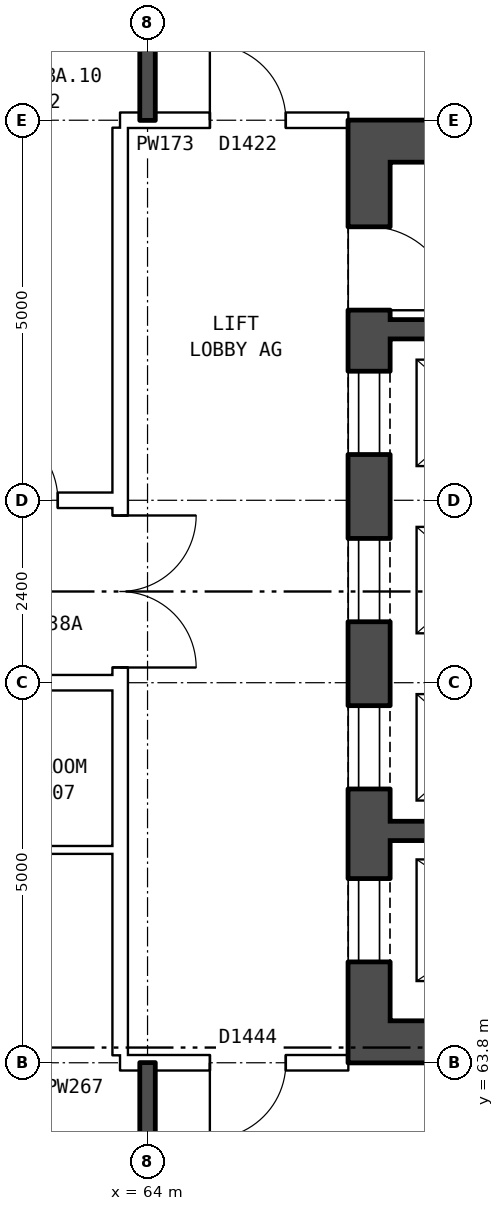
"""IFC4 building model, lengths in metres.
Left out: names, types, materials, properties, quantities, classifications, styles, units other than length and angle.
Written with IfcOpenShell. Run it as: python <this file> out.ifc"""

import sys

from ifc_helpers import new_model, si_unit, direction, frame, frame_2d, origin, place, context, subcontext, project, spatial, rectangle, extrude, element, fill, save


model = new_model("IFC4")
c1 = context("Model", 3, precision=1e-05, world=origin(), true_north=direction((0.0, 1.0)))
c2 = subcontext(c1, "Body", "Model", "MODEL_VIEW")
j1 = project(units=[si_unit("LENGTHUNIT", "METRE"), si_unit("PLANEANGLEUNIT", "RADIAN")], contexts=[c1])
p1 = place(None, origin())
s1 = spatial("IfcSite", under=j1, at=p1, CompositionType="ELEMENT")
p2 = place(p1, origin())
s2 = spatial("IfcBuilding", under=s1, at=p2, CompositionType="ELEMENT")
p3 = place(p2, frame((0.0, 0.0, 136.1)))
s3 = spatial("IfcBuildingStorey", under=s2, at=p3, CompositionType="ELEMENT", Elevation=136.1)
p4 = place(p3, frame((66.915, 63.8, 0.0), z_axis=(0.0, 0.0, 1.0), x_axis=(0.0, 1.0, 0.0)))
e1 = element("IfcWall", 1, at=p4, inside=s3, PredefinedType="SHEAR", context=c2, shape_type="SweptSolid", body=[
    extrude(rectangle(XDim=12.4, YDim=0.55, at=frame_2d((6.2, 0.0))), origin(), (0.0, 0.0, 1.0), 2.85),
])
p5 = place(p4, frame((1.325, 0.0, 0.0)))
e2 = element("IfcOpeningElement", 2, at=p5, cuts=e1, PredefinedType="OPENING", context=c2, shape_type="SweptSolid", body=[
    extrude(rectangle(XDim=1.1, YDim=2.1, at=frame_2d((0.55, 1.05))), frame((0.0, 0.285, 0.0), z_axis=(0.0, -1.0, 0.0), x_axis=(1.0, 0.0, 0.0)), (0.0, 0.0, 1.0), 0.57),
])
p6 = place(p4, frame((3.6, 0.0, 0.0)))
e3 = element("IfcOpeningElement", 3, at=p6, cuts=e1, PredefinedType="OPENING", context=c2, shape_type="SweptSolid", body=[
    extrude(rectangle(XDim=1.1, YDim=2.1, at=frame_2d((0.55, 1.05))), frame((0.0, 0.285, 0.0), z_axis=(0.0, -1.0, 0.0), x_axis=(1.0, 0.0, 0.0)), (0.0, 0.0, 1.0), 0.57),
])
p7 = place(p4, frame((5.8, 0.0, 0.0)))
e4 = element("IfcOpeningElement", 4, at=p7, cuts=e1, PredefinedType="OPENING", context=c2, shape_type="SweptSolid", body=[
    extrude(rectangle(XDim=1.1, YDim=2.1, at=frame_2d((0.55, 1.05))), frame((0.0, 0.285, 0.0), z_axis=(0.0, -1.0, 0.0), x_axis=(1.0, 0.0, 0.0)), (0.0, 0.0, 1.0), 0.57),
])
p8 = place(p4, frame((8.0, 0.0, 0.0)))
e5 = element("IfcOpeningElement", 5, at=p8, cuts=e1, PredefinedType="OPENING", context=c2, shape_type="SweptSolid", body=[
    extrude(rectangle(XDim=1.1, YDim=2.1, at=frame_2d((0.55, 1.05))), frame((0.0, 0.285, 0.0), z_axis=(0.0, -1.0, 0.0), x_axis=(1.0, 0.0, 0.0)), (0.0, 0.0, 1.0), 0.57),
])
p9 = place(p4, frame((9.9, 0.0, 0.0)))
e6 = element("IfcOpeningElement", 6, at=p9, cuts=e1, PredefinedType="OPENING", context=c2, shape_type="SweptSolid", body=[
    extrude(rectangle(XDim=1.1, YDim=2.1, at=frame_2d((0.55, 1.05))), frame((0.0, 0.285, 0.0), z_axis=(0.0, -1.0, 0.0), x_axis=(1.0, 0.0, 0.0)), (0.0, 0.0, 1.0), 0.57),
])
for number, where, z_axis, x_axis in (
    (7, (67.19, 64.075, 0.0), (0.0, 0.0, 1.0), (1.0, 0.0, 0.0)),
    (8, (67.19, 75.925, 0.0), (0.0, 0.0, 1.0), (1.0, 0.0, 0.0)),
):
    element("IfcWall", number, at=place(p3, frame(where, z_axis=z_axis, x_axis=x_axis)), inside=s3, PredefinedType="SHEAR", context=c2, shape_type="SweptSolid", body=[
        extrude(rectangle(XDim=7.9, YDim=0.55, at=frame_2d((3.95, 0.0))), origin(), (0.0, 0.0, 1.0), 2.85),
    ])
p10 = place(p3, frame((67.19, 66.85, 0.0), z_axis=(0.0, 0.0, 1.0), x_axis=(1.0, 0.0, 0.0)))
e9 = element("IfcWall", 9, at=p10, inside=s3, PredefinedType="SHEAR", context=c2, shape_type="SweptSolid", body=[
    extrude(rectangle(XDim=3.445, YDim=0.25, at=frame_2d((1.723, 0.0))), origin(), (0.0, 0.0, 1.0), 2.85),
])
p11 = place(p3, frame((67.19, 73.45, 0.0), z_axis=(0.0, 0.0, 1.0), x_axis=(1.0, 0.0, 0.0)))
e10 = element("IfcWall", 10, at=p11, inside=s3, PredefinedType="SHEAR", context=c2, shape_type="SweptSolid", body=[
    extrude(rectangle(XDim=2.375, YDim=0.25, at=frame_2d((1.188, 0.0))), origin(), (0.0, 0.0, 1.0), 2.85),
])
p12 = place(p3, frame((63.64, 63.9, 0.0), z_axis=(0.0, 0.0, 1.0), x_axis=(0.0, 1.0, 0.0)))
e11 = element("IfcWall", 11, at=p12, inside=s3, PredefinedType="PARTITIONING", context=c2, shape_type="SweptSolid", body=[
    extrude(rectangle(XDim=12.2, YDim=0.2, at=frame_2d((6.1, 0.0))), origin(), (0.0, 0.0, 1.0), 2.85),
])
p13 = place(p12, frame((5.1, 0.0, 0.0)))
e12 = element("IfcOpeningElement", 12, at=p13, cuts=e11, PredefinedType="OPENING", context=c2, shape_type="SweptSolid", body=[
    extrude(rectangle(XDim=2.0, YDim=2.1, at=frame_2d((1.0, 1.05))), frame((0.0, 0.11, 0.0), z_axis=(0.0, -1.0, 0.0), x_axis=(1.0, 0.0, 0.0)), (0.0, 0.0, 1.0), 0.22),
])
p14 = place(p3, frame((63.64, 63.8, 0.0), z_axis=(0.0, 0.0, 1.0), x_axis=(1.0, 0.0, 0.0)))
e13 = element("IfcWall", 13, at=p14, inside=s3, PredefinedType="PARTITIONING", context=c2, shape_type="SweptSolid", body=[
    extrude(rectangle(XDim=3.0, YDim=0.2, at=frame_2d((1.5, 0.0))), origin(), (0.0, 0.0, 1.0), 2.85),
])
p15 = place(p14, frame((1.18, 0.0, 0.0)))
e14 = element("IfcOpeningElement", 14, at=p15, cuts=e13, PredefinedType="OPENING", context=c2, shape_type="SweptSolid", body=[
    extrude(rectangle(XDim=1.0, YDim=2.1, at=frame_2d((0.5, 1.05))), frame((0.0, 0.11, 0.0), z_axis=(0.0, -1.0, 0.0), x_axis=(1.0, 0.0, 0.0)), (0.0, 0.0, 1.0), 0.22),
])
p16 = place(p3, frame((61.0, 66.6, 0.0), z_axis=(0.0, 0.0, 1.0), x_axis=(1.0, 0.0, 0.0)))
e15 = element("IfcWall", 15, at=p16, inside=s3, PredefinedType="PARTITIONING", context=c2, shape_type="SweptSolid", body=[
    extrude(rectangle(XDim=2.64, YDim=0.1, at=frame_2d((1.32, 0.0))), origin(), (0.0, 0.0, 1.0), 2.85),
])
p17 = place(p3, frame((44.36, 68.8, 0.0), z_axis=(0.0, 0.0, 1.0), x_axis=(1.0, 0.0, 0.0)))
e16 = element("IfcWall", 16, at=p17, inside=s3, PredefinedType="PARTITIONING", context=c2, shape_type="SweptSolid", body=[
    extrude(rectangle(XDim=19.28, YDim=0.2, at=frame_2d((9.64, 0.0))), origin(), (0.0, 0.0, 1.0), 2.85),
])
p18 = place(p17, frame((14.64, 0.0, 0.0)))
e17 = element("IfcOpeningElement", 17, at=p18, cuts=e16, PredefinedType="OPENING", context=c2, shape_type="SweptSolid", body=[
    extrude(rectangle(XDim=1.0, YDim=2.1, at=frame_2d((0.5, 1.05))), frame((0.0, 0.11, 0.0), z_axis=(0.0, -1.0, 0.0), x_axis=(1.0, 0.0, 0.0)), (0.0, 0.0, 1.0), 0.22),
])
p19 = place(p17, frame((8.64, 0.0, 0.0)))
e18 = element("IfcOpeningElement", 18, at=p19, cuts=e16, PredefinedType="OPENING", context=c2, shape_type="SweptSolid", body=[
    extrude(rectangle(XDim=1.0, YDim=2.1, at=frame_2d((0.5, 1.05))), frame((0.0, 0.11, 0.0), z_axis=(0.0, -1.0, 0.0), x_axis=(1.0, 0.0, 0.0)), (0.0, 0.0, 1.0), 0.22),
])
p20 = place(p17, frame((2.64, 0.0, 0.0)))
e19 = element("IfcOpeningElement", 19, at=p20, cuts=e16, PredefinedType="OPENING", context=c2, shape_type="SweptSolid", body=[
    extrude(rectangle(XDim=1.0, YDim=2.1, at=frame_2d((0.5, 1.05))), frame((0.0, 0.11, 0.0), z_axis=(0.0, -1.0, 0.0), x_axis=(1.0, 0.0, 0.0)), (0.0, 0.0, 1.0), 0.22),
])
p21 = place(p3, frame((44.36, 71.2, 0.0), z_axis=(0.0, 0.0, 1.0), x_axis=(1.0, 0.0, 0.0)))
e20 = element("IfcWall", 20, at=p21, inside=s3, PredefinedType="PARTITIONING", context=c2, shape_type="SweptSolid", body=[
    extrude(rectangle(XDim=19.28, YDim=0.2, at=frame_2d((9.64, 0.0))), origin(), (0.0, 0.0, 1.0), 2.85),
])
p22 = place(p21, frame((17.46, 0.0, 0.0)))
e21 = element("IfcOpeningElement", 21, at=p22, cuts=e20, PredefinedType="OPENING", context=c2, shape_type="SweptSolid", body=[
    extrude(rectangle(XDim=1.0, YDim=2.1, at=frame_2d((0.5, 1.05))), frame((0.0, 0.11, 0.0), z_axis=(0.0, -1.0, 0.0), x_axis=(1.0, 0.0, 0.0)), (0.0, 0.0, 1.0), 0.22),
])
p23 = place(p21, frame((8.64, 0.0, 0.0)))
e22 = element("IfcOpeningElement", 22, at=p23, cuts=e20, PredefinedType="OPENING", context=c2, shape_type="SweptSolid", body=[
    extrude(rectangle(XDim=1.0, YDim=2.1, at=frame_2d((0.5, 1.05))), frame((0.0, 0.11, 0.0), z_axis=(0.0, -1.0, 0.0), x_axis=(1.0, 0.0, 0.0)), (0.0, 0.0, 1.0), 0.22),
])
p24 = place(p21, frame((2.64, 0.0, 0.0)))
e23 = element("IfcOpeningElement", 23, at=p24, cuts=e20, PredefinedType="OPENING", context=c2, shape_type="SweptSolid", body=[
    extrude(rectangle(XDim=1.0, YDim=2.1, at=frame_2d((0.5, 1.05))), frame((0.0, 0.11, 0.0), z_axis=(0.0, -1.0, 0.0), x_axis=(1.0, 0.0, 0.0)), (0.0, 0.0, 1.0), 0.22),
])
p25 = place(p3, frame((63.64, 76.2, 0.0), z_axis=(0.0, 0.0, 1.0), x_axis=(1.0, 0.0, 0.0)))
e24 = element("IfcWall", 24, at=p25, inside=s3, PredefinedType="PARTITIONING", context=c2, shape_type="SweptSolid", body=[
    extrude(rectangle(XDim=3.0, YDim=0.2, at=frame_2d((1.5, 0.0))), origin(), (0.0, 0.0, 1.0), 2.85),
])
p26 = place(p25, frame((1.18, 0.0, 0.0)))
e25 = element("IfcOpeningElement", 25, at=p26, cuts=e24, PredefinedType="OPENING", context=c2, shape_type="SweptSolid", body=[
    extrude(rectangle(XDim=1.0, YDim=2.1, at=frame_2d((0.5, 1.05))), frame((0.0, 0.11, 0.0), z_axis=(0.0, -1.0, 0.0), x_axis=(1.0, 0.0, 0.0)), (0.0, 0.0, 1.0), 0.22),
])
for number, where, z_axis, x_axis in (
    (26, (64.0, 54.36, 0.0), (0.0, 0.0, 1.0), (0.0, 1.0, 0.0)),
    (27, (64.0, 76.2, 0.0), (0.0, 0.0, 1.0), (0.0, 1.0, 0.0)),
):
    element("IfcWall", number, at=place(p3, frame(where, z_axis=z_axis, x_axis=x_axis)), inside=s3, PredefinedType="SOLIDWALL", context=c2, shape_type="SweptSolid", body=[
        extrude(rectangle(XDim=9.44, YDim=0.2, at=frame_2d((4.72, 0.0))), origin(), (0.0, 0.0, 1.0), 2.85),
    ])
p27 = place(p5, origin())
e28 = element("IfcDoor", 28, at=p27, inside=s3, OperationType="DOUBLE_DOOR_SLIDING", PredefinedType="DOOR", context=c2, shape_type="SweptSolid", body=[
    extrude(rectangle(XDim=1.1, YDim=2.1, at=frame_2d((0.55, 1.05))), frame((0.0, -0.21, 0.0), z_axis=(0.0, -1.0, 0.0), x_axis=(1.0, 0.0, 0.0)), (0.0, 0.0, 1.0), 0.05),
])
fill(e2, e28)
p28 = place(p6, origin())
e29 = element("IfcDoor", 29, at=p28, inside=s3, OperationType="DOUBLE_DOOR_SLIDING", PredefinedType="DOOR", context=c2, shape_type="SweptSolid", body=[
    extrude(rectangle(XDim=1.1, YDim=2.1, at=frame_2d((0.55, 1.05))), frame((0.0, -0.21, 0.0), z_axis=(0.0, -1.0, 0.0), x_axis=(1.0, 0.0, 0.0)), (0.0, 0.0, 1.0), 0.05),
])
fill(e3, e29)
p29 = place(p7, origin())
e30 = element("IfcDoor", 30, at=p29, inside=s3, OperationType="DOUBLE_DOOR_SLIDING", PredefinedType="DOOR", context=c2, shape_type="SweptSolid", body=[
    extrude(rectangle(XDim=1.1, YDim=2.1, at=frame_2d((0.55, 1.05))), frame((0.0, -0.21, 0.0), z_axis=(0.0, -1.0, 0.0), x_axis=(1.0, 0.0, 0.0)), (0.0, 0.0, 1.0), 0.05),
])
fill(e4, e30)
p30 = place(p8, origin())
e31 = element("IfcDoor", 31, at=p30, inside=s3, OperationType="DOUBLE_DOOR_SLIDING", PredefinedType="DOOR", context=c2, shape_type="SweptSolid", body=[
    extrude(rectangle(XDim=1.1, YDim=2.1, at=frame_2d((0.55, 1.05))), frame((0.0, -0.21, 0.0), z_axis=(0.0, -1.0, 0.0), x_axis=(1.0, 0.0, 0.0)), (0.0, 0.0, 1.0), 0.05),
])
fill(e5, e31)
p31 = place(p9, frame((1.1, 0.0, 0.0), z_axis=(0.0, 0.0, 1.0), x_axis=(-1.0, 0.0, 0.0)))
e32 = element("IfcDoor", 32, at=p31, inside=s3, OperationType="SINGLE_SWING_RIGHT", PredefinedType="DOOR", context=c2, shape_type="SweptSolid", body=[
    extrude(rectangle(XDim=1.1, YDim=2.1, at=frame_2d((0.55, 1.05))), frame((0.0, 0.26, 0.0), z_axis=(0.0, -1.0, 0.0), x_axis=(1.0, 0.0, 0.0)), (0.0, 0.0, 1.0), 0.05),
])
fill(e6, e32)
p32 = place(p13, frame((2.0, 0.0, 0.0), z_axis=(0.0, 0.0, 1.0), x_axis=(-1.0, 0.0, 0.0)))
e33 = element("IfcDoor", 33, at=p32, inside=s3, OperationType="DOUBLE_DOOR_SINGLE_SWING", PredefinedType="DOOR", context=c2, shape_type="SweptSolid", body=[
    extrude(rectangle(XDim=2.0, YDim=2.1, at=frame_2d((1.0, 1.05))), frame((0.0, 0.025, 0.0), z_axis=(0.0, -1.0, 0.0), x_axis=(1.0, 0.0, 0.0)), (0.0, 0.0, 1.0), 0.05),
])
fill(e12, e33)
p33 = place(p15, frame((1.0, 0.0, 0.0), z_axis=(0.0, 0.0, 1.0), x_axis=(-1.0, 0.0, 0.0)))
e34 = element("IfcDoor", 34, at=p33, inside=s3, OperationType="SINGLE_SWING_RIGHT", PredefinedType="DOOR", context=c2, shape_type="SweptSolid", body=[
    extrude(rectangle(XDim=1.0, YDim=2.1, at=frame_2d((0.5, 1.05))), frame((0.0, 0.025, 0.0), z_axis=(0.0, -1.0, 0.0), x_axis=(1.0, 0.0, 0.0)), (0.0, 0.0, 1.0), 0.05),
])
fill(e14, e34)
p34 = place(p26, origin())
e35 = element("IfcDoor", 35, at=p34, inside=s3, OperationType="SINGLE_SWING_LEFT", PredefinedType="DOOR", context=c2, shape_type="SweptSolid", body=[
    extrude(rectangle(XDim=1.0, YDim=2.1, at=frame_2d((0.5, 1.05))), frame((0.0, 0.025, 0.0), z_axis=(0.0, -1.0, 0.0), x_axis=(1.0, 0.0, 0.0)), (0.0, 0.0, 1.0), 0.05),
])
fill(e25, e35)
p35 = place(p22, origin())
e36 = element("IfcDoor", 36, at=p35, inside=s3, OperationType="SINGLE_SWING_LEFT", PredefinedType="DOOR", context=c2, shape_type="SweptSolid", body=[
    extrude(rectangle(XDim=1.0, YDim=2.1, at=frame_2d((0.5, 1.05))), frame((0.0, 0.025, 0.0), z_axis=(0.0, -1.0, 0.0), x_axis=(1.0, 0.0, 0.0)), (0.0, 0.0, 1.0), 0.05),
])
fill(e21, e36)
save(model, sys.argv[1])
